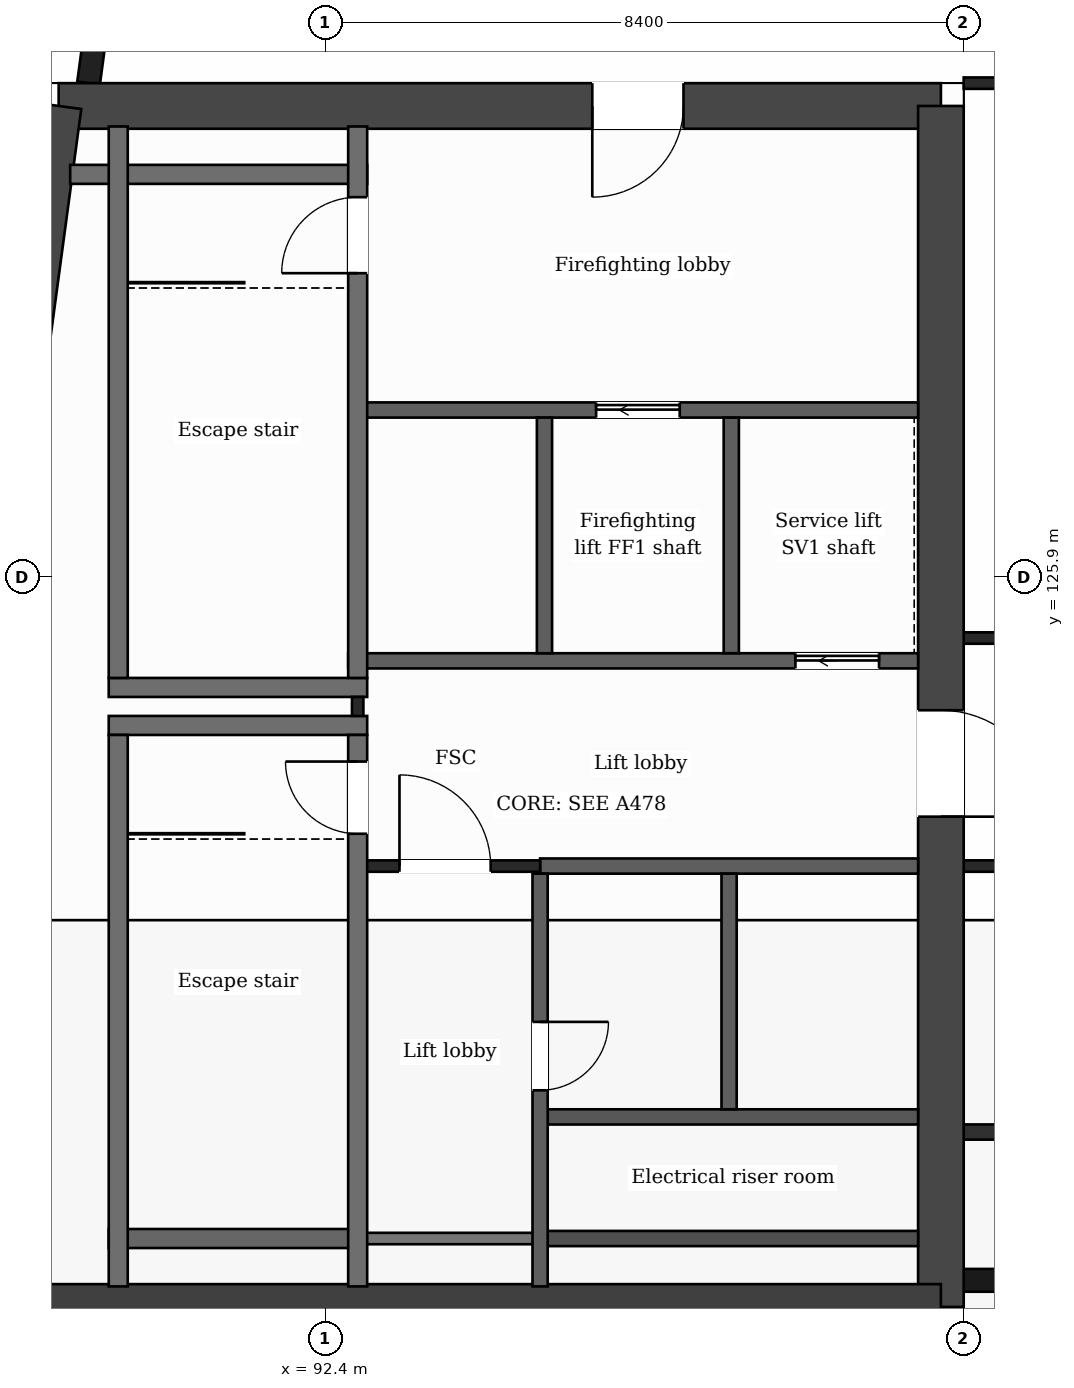
"""IFC4 building model, lengths in metres.
Left out: names, types, materials, properties, quantities, classifications, styles, units other than length and angle.
Written with IfcOpenShell. Run it as: python <this file> out.ifc"""

import sys

from ifc_helpers import new_model, si_unit, direction, frame, frame_2d, origin, place, context, subcontext, project, spatial, polyline, rectangle, outline, extrude, element, fill, save


model = new_model("IFC4")
c1 = context("Model", 3, precision=1e-05, world=origin(), true_north=direction((0.0, 1.0)))
c2 = subcontext(c1, "Body", "Model", "MODEL_VIEW")
j1 = project(units=[si_unit("LENGTHUNIT", "METRE"), si_unit("PLANEANGLEUNIT", "RADIAN")], contexts=[c1])
p1 = place(None, origin())
s1 = spatial("IfcSite", under=j1, at=p1, CompositionType="ELEMENT")
p2 = place(p1, origin())
s2 = spatial("IfcBuilding", under=s1, at=p2, CompositionType="ELEMENT")
p3 = place(p2, frame((0.0, 0.0, 319.9)))
s3 = spatial("IfcBuildingStorey", under=s2, at=p3, CompositionType="ELEMENT", Elevation=319.9)
p4 = place(p3, frame((88.893, 132.1, 0.0), z_axis=(0.0, 0.0, 1.0), x_axis=(1.0, 0.0, 0.0)))
e1 = element("IfcWall", 1, at=p4, inside=s3, PredefinedType="SHEAR", context=c2, shape_type="SweptSolid", body=[
    extrude(outline(polyline([(0.0, 0.0), (11.607, 0.0), (11.607, 9.665), (0.0, 9.665), (0.0, 0.0)])), frame((0.0, 0.3, 0.0), z_axis=(0.0, -1.0, 0.0), x_axis=(1.0, 0.0, 0.0)), (0.0, 0.0, 1.0), 0.6),
])
p5 = place(p4, frame((7.021, 0.0, 0.0)))
e2 = element("IfcOpeningElement", 2, at=p5, cuts=e1, PredefinedType="OPENING", context=c2, shape_type="SweptSolid", body=[
    extrude(rectangle(XDim=1.2, YDim=2.1, at=frame_2d((0.6, 1.05))), frame((0.0, 0.31, 0.0), z_axis=(0.0, -1.0, 0.0), x_axis=(1.0, 0.0, 0.0)), (0.0, 0.0, 1.0), 0.62),
])
p6 = place(p3, frame((100.5, 132.1, 0.0), z_axis=(0.0, 0.0, 1.0), x_axis=(0.0, -1.0, 0.0)))
e3 = element("IfcWall", 3, at=p6, inside=s3, PredefinedType="SHEAR", context=c2, shape_type="SweptSolid", body=[
    extrude(outline(polyline([(0.0, 0.0), (15.8, 0.0), (15.8, 1.162), (9.597, 4.5), (0.0, 9.665), (0.0, 0.0)])), frame((0.0, 0.3, 0.0), z_axis=(0.0, -1.0, 0.0), x_axis=(1.0, 0.0, 0.0)), (0.0, 0.0, 1.0), 0.6),
])
p7 = place(p6, frame((7.95, 0.0, 0.0)))
e4 = element("IfcOpeningElement", 4, at=p7, cuts=e3, PredefinedType="OPENING", context=c2, shape_type="SweptSolid", body=[
    extrude(rectangle(XDim=1.4, YDim=2.1, at=frame_2d((0.7, 1.05))), frame((0.0, 0.31, 0.0), z_axis=(0.0, -1.0, 0.0), x_axis=(1.0, 0.0, 0.0)), (0.0, 0.0, 1.0), 0.62),
])
p8 = place(p3, frame((100.5, 116.3, 0.0), z_axis=(0.0, 0.0, 1.0), x_axis=(-1.0, 0.0, 0.0)))
e5 = element("IfcWall", 5, at=p8, inside=s3, PredefinedType="SHEAR", context=c2, shape_type="SweptSolid", body=[
    extrude(outline(polyline([(0.0, 0.0), (13.734, 0.0), (13.734, 1.162), (0.0, 1.162), (0.0, 0.0)])), frame((0.0, 0.3, 0.0), z_axis=(0.0, -1.0, 0.0), x_axis=(1.0, 0.0, 0.0)), (0.0, 0.0, 1.0), 0.6),
])
p9 = place(p3, frame((86.766, 116.3, 0.0), z_axis=(0.0, 0.0, 1.0), x_axis=(0.13341345841, 0.991060466932, 0.0)))
e6 = element("IfcWall", 6, at=p9, inside=s3, PredefinedType="SHEAR", context=c2, shape_type="SweptSolid", body=[
    extrude(outline(polyline([(0.0, 0.0), (15.943, 0.0), (15.943, 9.665), (6.259, 4.5), (0.0, 1.162), (0.0, 0.0)])), frame((0.0, 0.3, 0.0), z_axis=(0.0, -1.0, 0.0), x_axis=(1.0, 0.0, 0.0)), (0.0, 0.0, 1.0), 0.6),
])
p10 = place(p3, frame((90.303, 139.95, 0.0), z_axis=(0.0, 0.0, 1.0), x_axis=(-0.133412617465, -0.991060580137, 0.0)))
e7 = element("IfcWall", 7, at=p10, inside=s3, PredefinedType="SOLIDWALL", context=c2, shape_type="SweptSolid", body=[
    extrude(rectangle(XDim=7.618, YDim=0.3, at=frame_2d((3.809, 0.0))), origin(), (0.0, 0.0, 1.0), 4.5),
])
p11 = place(p3, frame((100.8, 116.65, 0.0), z_axis=(0.0, 0.0, 1.0), x_axis=(1.0, 0.0, 0.0)))
e8 = element("IfcWall", 8, at=p11, inside=s3, PredefinedType="SOLIDWALL", context=c2, shape_type="SweptSolid", body=[
    extrude(rectangle(XDim=25.2, YDim=0.3, at=frame_2d((12.6, 0.0))), origin(), (0.0, 0.0, 1.0), 1.3),
])
p12 = place(p3, frame((95.227, 117.2, 0.0), z_axis=(0.0, 0.0, 1.0), x_axis=(1.0, 0.0, 0.0)))
e9 = element("IfcWall", 9, at=p12, inside=s3, PredefinedType="PARTITIONING", context=c2, shape_type="SweptSolid", body=[
    extrude(rectangle(XDim=4.973, YDim=0.2, at=frame_2d((2.486, 0.0))), origin(), (0.0, 0.0, 1.0), 1.596),
])
p13 = place(p3, frame((92.827, 117.2, 0.0), z_axis=(0.0, 0.0, 1.0), x_axis=(1.0, 0.0, 0.0)))
e10 = element("IfcWall", 10, at=p13, inside=s3, PredefinedType="PARTITIONING", context=c2, shape_type="SweptSolid", body=[
    extrude(rectangle(XDim=2.4, YDim=0.15, at=frame_2d((1.2, 0.0))), origin(), (0.0, 0.0, 1.0), 1.596),
])
p14 = place(p3, frame((89.552, 117.2, 0.0), z_axis=(0.0, 0.0, 1.0), x_axis=(1.0, 0.0, 0.0)))
e11 = element("IfcWall", 11, at=p14, inside=s3, PredefinedType="PARTITIONING", context=c2, shape_type="SweptSolid", body=[
    extrude(rectangle(XDim=3.275, YDim=0.25, at=frame_2d((1.637, 0.0))), origin(), (0.0, 0.0, 1.0), 1.596),
])
p15 = place(p3, frame((100.8, 118.601, 0.0), z_axis=(0.0, 0.0, 1.0), x_axis=(1.0, 0.0, 0.0)))
e12 = element("IfcWall", 12, at=p15, inside=s3, PredefinedType="PARTITIONING", context=c2, shape_type="SweptSolid", body=[
    extrude(rectangle(XDim=25.2, YDim=0.2, at=frame_2d((12.6, 0.0))), origin(), (0.0, 0.0, 1.0), 2.35),
])
p16 = place(p3, frame((95.227, 118.8, 0.0), z_axis=(0.0, 0.0, 1.0), x_axis=(1.0, 0.0, 0.0)))
e13 = element("IfcWall", 13, at=p16, inside=s3, PredefinedType="PARTITIONING", context=c2, shape_type="SweptSolid", body=[
    extrude(rectangle(XDim=4.973, YDim=0.2, at=frame_2d((2.486, 0.0))), origin(), (0.0, 0.0, 1.0), 2.457),
])
p17 = place(p3, frame((95.227, 122.1, 0.0), z_axis=(0.0, 0.0, 1.0), x_axis=(1.0, 0.0, 0.0)))
e14 = element("IfcWall", 14, at=p17, inside=s3, PredefinedType="PARTITIONING", context=c2, shape_type="SweptSolid", body=[
    extrude(rectangle(XDim=4.973, YDim=0.2, at=frame_2d((2.486, 0.0))), origin(), (0.0, 0.0, 1.0), 4.05),
])
p18 = place(p3, frame((92.827, 122.1, 0.0), z_axis=(0.0, 0.0, 1.0), x_axis=(1.0, 0.0, 0.0)))
e15 = element("IfcWall", 15, at=p18, inside=s3, PredefinedType="PARTITIONING", context=c2, shape_type="SweptSolid", body=[
    extrude(rectangle(XDim=2.4, YDim=0.15, at=frame_2d((1.2, 0.0))), origin(), (0.0, 0.0, 1.0), 4.05),
])
p19 = place(p18, frame((0.55, 0.0, 0.0)))
e16 = element("IfcOpeningElement", 16, at=p19, cuts=e15, PredefinedType="OPENING", context=c2, shape_type="SweptSolid", body=[
    extrude(rectangle(XDim=1.2, YDim=2.1, at=frame_2d((0.6, 1.05))), frame((0.0, 0.085, 0.0), z_axis=(0.0, -1.0, 0.0), x_axis=(1.0, 0.0, 0.0)), (0.0, 0.0, 1.0), 0.17),
])
p20 = place(p3, frame((100.8, 122.1, 0.0), z_axis=(0.0, 0.0, 1.0), x_axis=(1.0, 0.0, 0.0)))
e17 = element("IfcWall", 17, at=p20, inside=s3, PredefinedType="PARTITIONING", context=c2, shape_type="SweptSolid", body=[
    extrude(rectangle(XDim=25.2, YDim=0.15, at=frame_2d((12.6, 0.0))), origin(), (0.0, 0.0, 1.0), 4.05),
])
p21 = place(p20, frame((3.6, 0.0, 0.0)))
e18 = element("IfcOpeningElement", 18, at=p21, cuts=e17, PredefinedType="OPENING", context=c2, shape_type="SweptSolid", body=[
    extrude(rectangle(XDim=1.2, YDim=2.1, at=frame_2d((0.6, 1.05))), frame((0.0, 0.085, 0.0), z_axis=(0.0, -1.0, 0.0), x_axis=(1.0, 0.0, 0.0)), (0.0, 0.0, 1.0), 0.17),
])
p22 = place(p20, frame((12.0, 0.0, 0.0)))
e19 = element("IfcOpeningElement", 19, at=p22, cuts=e17, PredefinedType="OPENING", context=c2, shape_type="SweptSolid", body=[
    extrude(rectangle(XDim=1.2, YDim=2.1, at=frame_2d((0.6, 1.05))), frame((0.0, 0.085, 0.0), z_axis=(0.0, -1.0, 0.0), x_axis=(1.0, 0.0, 0.0)), (0.0, 0.0, 1.0), 0.17),
])
p23 = place(p20, frame((20.4, 0.0, 0.0)))
e20 = element("IfcOpeningElement", 20, at=p23, cuts=e17, PredefinedType="OPENING", context=c2, shape_type="SweptSolid", body=[
    extrude(rectangle(XDim=1.2, YDim=2.1, at=frame_2d((0.6, 1.05))), frame((0.0, 0.085, 0.0), z_axis=(0.0, -1.0, 0.0), x_axis=(1.0, 0.0, 0.0)), (0.0, 0.0, 1.0), 0.17),
])
for number, where, z_axis, x_axis in (
    (21, (89.552, 123.95, 0.0), (0.0, 0.0, 1.0), (1.0, 0.0, 0.0)),
    (22, (89.552, 124.45, 0.0), (0.0, 0.0, 1.0), (1.0, 0.0, 0.0)),
):
    element("IfcWall", number, at=place(p3, frame(where, z_axis=z_axis, x_axis=x_axis)), inside=s3, PredefinedType="PARTITIONING", context=c2, shape_type="SweptSolid", body=[
        extrude(rectangle(XDim=3.4, YDim=0.25, at=frame_2d((1.7, 0.0))), origin(), (0.0, 0.0, 1.0), 4.05),
    ])
p24 = place(p3, frame((92.702, 124.8, 0.0), z_axis=(0.0, 0.0, 1.0), x_axis=(1.0, 0.0, 0.0)))
e23 = element("IfcWall", 23, at=p24, inside=s3, PredefinedType="PARTITIONING", context=c2, shape_type="SweptSolid", body=[
    extrude(rectangle(XDim=7.498, YDim=0.2, at=frame_2d((3.749, 0.0))), origin(), (0.0, 0.0, 1.0), 4.05),
])
p25 = place(p24, frame((5.884, 0.0, 0.0)))
e24 = element("IfcOpeningElement", 24, at=p25, cuts=e23, PredefinedType="OPENING", context=c2, shape_type="SweptSolid", body=[
    extrude(rectangle(XDim=1.1, YDim=2.1, at=frame_2d((0.55, 1.05))), frame((0.0, 0.11, 0.0), z_axis=(0.0, -1.0, 0.0), x_axis=(1.0, 0.0, 0.0)), (0.0, 0.0, 1.0), 0.22),
])
p26 = place(p3, frame((100.8, 125.1, 0.0), z_axis=(0.0, 0.0, 1.0), x_axis=(1.0, 0.0, 0.0)))
e25 = element("IfcWall", 25, at=p26, inside=s3, PredefinedType="PARTITIONING", context=c2, shape_type="SweptSolid", body=[
    extrude(rectangle(XDim=25.2, YDim=0.15, at=frame_2d((12.6, 0.0))), origin(), (0.0, 0.0, 1.0), 4.05),
])
p27 = place(p26, frame((3.6, 0.0, 0.0)))
e26 = element("IfcOpeningElement", 26, at=p27, cuts=e25, PredefinedType="OPENING", context=c2, shape_type="SweptSolid", body=[
    extrude(rectangle(XDim=1.2, YDim=2.1, at=frame_2d((0.6, 1.05))), frame((0.0, 0.085, 0.0), z_axis=(0.0, -1.0, 0.0), x_axis=(1.0, 0.0, 0.0)), (0.0, 0.0, 1.0), 0.17),
])
p28 = place(p26, frame((12.0, 0.0, 0.0)))
e27 = element("IfcOpeningElement", 27, at=p28, cuts=e25, PredefinedType="OPENING", context=c2, shape_type="SweptSolid", body=[
    extrude(rectangle(XDim=1.2, YDim=2.1, at=frame_2d((0.6, 1.05))), frame((0.0, 0.085, 0.0), z_axis=(0.0, -1.0, 0.0), x_axis=(1.0, 0.0, 0.0)), (0.0, 0.0, 1.0), 0.17),
])
p29 = place(p26, frame((20.4, 0.0, 0.0)))
e28 = element("IfcOpeningElement", 28, at=p29, cuts=e25, PredefinedType="OPENING", context=c2, shape_type="SweptSolid", body=[
    extrude(rectangle(XDim=1.2, YDim=2.1, at=frame_2d((0.6, 1.05))), frame((0.0, 0.085, 0.0), z_axis=(0.0, -1.0, 0.0), x_axis=(1.0, 0.0, 0.0)), (0.0, 0.0, 1.0), 0.17),
])
p30 = place(p3, frame((92.827, 128.1, 0.0), z_axis=(0.0, 0.0, 1.0), x_axis=(1.0, 0.0, 0.0)))
e29 = element("IfcWall", 29, at=p30, inside=s3, PredefinedType="PARTITIONING", context=c2, shape_type="SweptSolid", body=[
    extrude(rectangle(XDim=7.373, YDim=0.2, at=frame_2d((3.687, 0.0))), origin(), (0.0, 0.0, 1.0), 4.05),
])
p31 = place(p30, frame((3.137, 0.0, 0.0)))
e30 = element("IfcOpeningElement", 30, at=p31, cuts=e29, PredefinedType="OPENING", context=c2, shape_type="SweptSolid", body=[
    extrude(rectangle(XDim=1.1, YDim=2.1, at=frame_2d((0.55, 1.05))), frame((0.0, 0.11, 0.0), z_axis=(0.0, -1.0, 0.0), x_axis=(1.0, 0.0, 0.0)), (0.0, 0.0, 1.0), 0.22),
])
p32 = place(p3, frame((89.045, 131.2, 0.0), z_axis=(0.0, 0.0, 1.0), x_axis=(1.0, 0.0, 0.0)))
e31 = element("IfcWall", 31, at=p32, inside=s3, PredefinedType="PARTITIONING", context=c2, shape_type="SweptSolid", body=[
    extrude(rectangle(XDim=3.907, YDim=0.25, at=frame_2d((1.954, 0.0))), origin(), (0.0, 0.0, 1.0), 4.05),
])
p33 = place(p3, frame((100.8, 132.4, 0.0), z_axis=(0.0, 0.0, 1.0), x_axis=(1.0, 0.0, 0.0)))
e32 = element("IfcWall", 32, at=p33, inside=s3, PredefinedType="PARTITIONING", context=c2, shape_type="SweptSolid", body=[
    extrude(rectangle(XDim=25.2, YDim=0.15, at=frame_2d((12.6, 0.0))), origin(), (0.0, 0.0, 1.0), 4.05),
])
p34 = place(p3, frame((89.677, 116.57, 0.0), z_axis=(0.0, 0.0, 1.0), x_axis=(0.0, 1.0, 0.0)))
e33 = element("IfcWall", 33, at=p34, inside=s3, PredefinedType="PARTITIONING", context=c2, shape_type="SweptSolid", body=[
    extrude(outline(polyline([(0.0, 0.0), (7.255, 0.0), (7.255, 4.05), (5.19, 4.05), (0.0, 1.257), (0.0, 0.0)])), frame((0.0, 0.125, 0.0), z_axis=(0.0, -1.0, 0.0), x_axis=(1.0, 0.0, 0.0)), (0.0, 0.0, 1.0), 0.25),
])
p35 = place(p3, frame((89.677, 124.575, 0.0), z_axis=(0.0, 0.0, 1.0), x_axis=(0.0, 1.0, 0.0)))
e34 = element("IfcWall", 34, at=p35, inside=s3, PredefinedType="PARTITIONING", context=c2, shape_type="SweptSolid", body=[
    extrude(rectangle(XDim=7.255, YDim=0.25, at=frame_2d((3.627, 0.0))), origin(), (0.0, 0.0, 1.0), 4.05),
])
p36 = place(p3, frame((92.827, 124.075, 0.0), z_axis=(0.0, 0.0, 1.0), x_axis=(0.0, 1.0, 0.0)))
e35 = element("IfcWall", 35, at=p36, inside=s3, PredefinedType="PARTITIONING", context=c2, shape_type="SweptSolid", body=[
    extrude(rectangle(XDim=0.25, YDim=0.15, at=frame_2d((0.125, 0.0))), origin(), (0.0, 0.0, 1.0), 4.05),
])
p37 = place(p3, frame((92.827, 116.57, 0.0), z_axis=(0.0, 0.0, 1.0), x_axis=(0.0, 1.0, 0.0)))
e36 = element("IfcWall", 36, at=p37, inside=s3, PredefinedType="PARTITIONING", context=c2, shape_type="SweptSolid", body=[
    extrude(outline(polyline([(0.0, 0.0), (7.255, 0.0), (7.255, 4.05), (5.19, 4.05), (0.0, 1.257), (0.0, 0.0)])), frame((0.0, 0.125, 0.0), z_axis=(0.0, -1.0, 0.0), x_axis=(1.0, 0.0, 0.0)), (0.0, 0.0, 1.0), 0.25),
])
p38 = place(p37, frame((5.955, 0.0, 0.0)))
e37 = element("IfcOpeningElement", 37, at=p38, cuts=e36, PredefinedType="OPENING", context=c2, shape_type="SweptSolid", body=[
    extrude(rectangle(XDim=0.95, YDim=2.1, at=frame_2d((0.475, 1.05))), frame((0.0, 0.135, 0.0), z_axis=(0.0, -1.0, 0.0), x_axis=(1.0, 0.0, 0.0)), (0.0, 0.0, 1.0), 0.27),
])
p39 = place(p3, frame((92.827, 124.575, 0.0), z_axis=(0.0, 0.0, 1.0), x_axis=(0.0, 1.0, 0.0)))
e38 = element("IfcWall", 38, at=p39, inside=s3, PredefinedType="PARTITIONING", context=c2, shape_type="SweptSolid", body=[
    extrude(rectangle(XDim=7.255, YDim=0.25, at=frame_2d((3.627, 0.0))), origin(), (0.0, 0.0, 1.0), 4.05),
])
p40 = place(p39, frame((5.325, 0.0, 0.0)))
e39 = element("IfcOpeningElement", 39, at=p40, cuts=e38, PredefinedType="OPENING", context=c2, shape_type="SweptSolid", body=[
    extrude(rectangle(XDim=1.0, YDim=2.1, at=frame_2d((0.5, 1.05))), frame((0.0, 0.135, 0.0), z_axis=(0.0, -1.0, 0.0), x_axis=(1.0, 0.0, 0.0)), (0.0, 0.0, 1.0), 0.27),
])
p41 = place(p3, frame((95.227, 116.57, 0.0), z_axis=(0.0, 0.0, 1.0), x_axis=(0.0, 1.0, 0.0)))
e40 = element("IfcWall", 40, at=p41, inside=s3, PredefinedType="PARTITIONING", context=c2, shape_type="SweptSolid", body=[
    extrude(outline(polyline([(0.0, 0.0), (5.43, 0.0), (5.43, 4.05), (5.19, 4.05), (0.0, 1.257), (0.0, 0.0)])), frame((0.0, 0.1, 0.0), z_axis=(0.0, -1.0, 0.0), x_axis=(1.0, 0.0, 0.0)), (0.0, 0.0, 1.0), 0.2),
])
p42 = place(p41, frame((2.58, 0.0, 0.0)))
e41 = element("IfcOpeningElement", 41, at=p42, cuts=e40, PredefinedType="OPENING", context=c2, shape_type="SweptSolid", body=[
    extrude(rectangle(XDim=0.9, YDim=2.1, at=frame_2d((0.45, 1.05))), frame((0.0, 0.11, 0.0), z_axis=(0.0, -1.0, 0.0), x_axis=(1.0, 0.0, 0.0)), (0.0, 0.0, 1.0), 0.22),
])
p43 = place(p3, frame((95.285, 124.9, 0.0), z_axis=(0.0, 0.0, 1.0), x_axis=(0.0, 1.0, 0.0)))
e42 = element("IfcWall", 42, at=p43, inside=s3, PredefinedType="PARTITIONING", context=c2, shape_type="SweptSolid", body=[
    extrude(rectangle(XDim=3.1, YDim=0.2, at=frame_2d((1.55, 0.0))), origin(), (0.0, 0.0, 1.0), 4.05),
])
p44 = place(p3, frame((97.713, 118.9, 0.0), z_axis=(0.0, 0.0, 1.0), x_axis=(0.0, 1.0, 0.0)))
e43 = element("IfcWall", 43, at=p44, inside=s3, PredefinedType="PARTITIONING", context=c2, shape_type="SweptSolid", body=[
    extrude(outline(polyline([(0.0, 0.0), (3.1, 0.0), (3.1, 4.05), (2.86, 4.05), (0.0, 2.511), (0.0, 0.0)])), frame((0.0, 0.1, 0.0), z_axis=(0.0, -1.0, 0.0), x_axis=(1.0, 0.0, 0.0)), (0.0, 0.0, 1.0), 0.2),
])
p45 = place(p3, frame((97.742, 124.9, 0.0), z_axis=(0.0, 0.0, 1.0), x_axis=(0.0, 1.0, 0.0)))
e44 = element("IfcWall", 44, at=p45, inside=s3, PredefinedType="PARTITIONING", context=c2, shape_type="SweptSolid", body=[
    extrude(rectangle(XDim=3.1, YDim=0.2, at=frame_2d((1.55, 0.0))), origin(), (0.0, 0.0, 1.0), 4.05),
])
p46 = place(p19, origin())
e45 = element("IfcDoor", 45, at=p46, inside=s3, OperationType="SINGLE_SWING_LEFT", PredefinedType="DOOR", context=c2, shape_type="SweptSolid", body=[
    extrude(rectangle(XDim=1.2, YDim=2.1, at=frame_2d((0.6, 1.05))), frame((0.0, 0.025, 0.0), z_axis=(0.0, -1.0, 0.0), x_axis=(1.0, 0.0, 0.0)), (0.0, 0.0, 1.0), 0.05),
])
fill(e16, e45)
p47 = place(p31, origin())
e46 = element("IfcDoor", 46, at=p47, inside=s3, OperationType="SLIDING_TO_LEFT", PredefinedType="DOOR", context=c2, shape_type="SweptSolid", body=[
    extrude(rectangle(XDim=1.1, YDim=2.1, at=frame_2d((0.55, 1.05))), frame((0.0, 0.025, 0.0), z_axis=(0.0, -1.0, 0.0), x_axis=(1.0, 0.0, 0.0)), (0.0, 0.0, 1.0), 0.05),
])
fill(e30, e46)
p48 = place(p25, origin())
e47 = element("IfcDoor", 47, at=p48, inside=s3, OperationType="SLIDING_TO_LEFT", PredefinedType="DOOR", context=c2, shape_type="SweptSolid", body=[
    extrude(rectangle(XDim=1.1, YDim=2.1, at=frame_2d((0.55, 1.05))), frame((0.0, 0.025, 0.0), z_axis=(0.0, -1.0, 0.0), x_axis=(1.0, 0.0, 0.0)), (0.0, 0.0, 1.0), 0.05),
])
fill(e24, e47)
p49 = place(p38, origin())
e48 = element("IfcDoor", 48, at=p49, inside=s3, OperationType="SINGLE_SWING_RIGHT", PredefinedType="DOOR", context=c2, shape_type="SweptSolid", body=[
    extrude(rectangle(XDim=0.95, YDim=2.1, at=frame_2d((0.475, 1.05))), frame((0.0, 0.025, 0.0), z_axis=(0.0, -1.0, 0.0), x_axis=(1.0, 0.0, 0.0)), (0.0, 0.0, 1.0), 0.05),
])
fill(e37, e48)
p50 = place(p40, origin())
e49 = element("IfcDoor", 49, at=p50, inside=s3, OperationType="SINGLE_SWING_LEFT", PredefinedType="DOOR", context=c2, shape_type="SweptSolid", body=[
    extrude(rectangle(XDim=1.0, YDim=2.1, at=frame_2d((0.5, 1.05))), frame((0.0, 0.025, 0.0), z_axis=(0.0, -1.0, 0.0), x_axis=(1.0, 0.0, 0.0)), (0.0, 0.0, 1.0), 0.05),
])
fill(e39, e49)
p51 = place(p42, origin())
e50 = element("IfcDoor", 50, at=p51, inside=s3, OperationType="SINGLE_SWING_RIGHT", PredefinedType="DOOR", context=c2, shape_type="SweptSolid", body=[
    extrude(rectangle(XDim=0.9, YDim=2.1, at=frame_2d((0.45, 1.05))), frame((0.0, 0.025, 0.0), z_axis=(0.0, -1.0, 0.0), x_axis=(1.0, 0.0, 0.0)), (0.0, 0.0, 1.0), 0.05),
])
fill(e41, e50)
p52 = place(p5, origin())
e51 = element("IfcDoor", 51, at=p52, inside=s3, OperationType="SINGLE_SWING_LEFT", PredefinedType="DOOR", context=c2, shape_type="SweptSolid", body=[
    extrude(rectangle(XDim=1.2, YDim=2.1, at=frame_2d((0.6, 1.05))), frame((0.0, 0.025, 0.0), z_axis=(0.0, -1.0, 0.0), x_axis=(1.0, 0.0, 0.0)), (0.0, 0.0, 1.0), 0.05),
])
fill(e2, e51)
p53 = place(p7, origin())
e52 = element("IfcDoor", 52, at=p53, inside=s3, OperationType="SINGLE_SWING_RIGHT", PredefinedType="DOOR", context=c2, shape_type="SweptSolid", body=[
    extrude(rectangle(XDim=1.4, YDim=2.1, at=frame_2d((0.7, 1.05))), frame((0.0, 0.025, 0.0), z_axis=(0.0, -1.0, 0.0), x_axis=(1.0, 0.0, 0.0)), (0.0, 0.0, 1.0), 0.05),
])
fill(e4, e52)
save(model, sys.argv[1])
